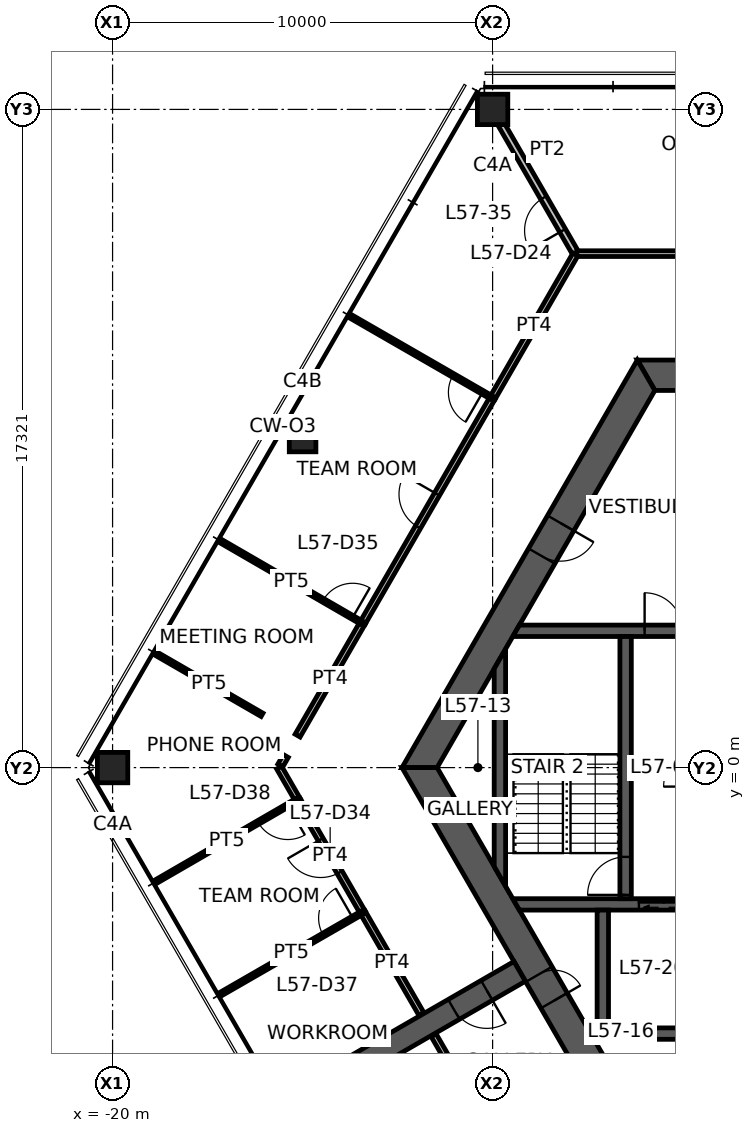
"""IFC4 building model, lengths in metres.
Left out: names, types, materials, properties, quantities, classifications, styles, units other than length and angle.
Written with IfcOpenShell. Run it as: python <this file> out.ifc"""

import sys

from ifc_helpers import new_model, si_unit, direction, frame, frame_2d, origin, origin_2d, place, context, subcontext, project, spatial, polyline, rectangle, hollow_rectangle, outline, extrude, element, fill, save


model = new_model("IFC4")
c1 = context("Model", 3, precision=1e-05, world=origin(), true_north=direction((0.0, 1.0)))
c2 = subcontext(c1, "Body", "Model", "MODEL_VIEW")
j1 = project(units=[si_unit("LENGTHUNIT", "METRE"), si_unit("PLANEANGLEUNIT", "RADIAN")], contexts=[c1])
p1 = place(None, origin())
s1 = spatial("IfcSite", under=j1, at=p1, CompositionType="ELEMENT")
p2 = place(p1, origin())
s2 = spatial("IfcBuilding", under=s1, at=p2, CompositionType="ELEMENT")
p3 = place(p2, frame((0.0, 0.0, 228.4)))
s3 = spatial("IfcBuildingStorey", under=s2, at=p3, CompositionType="ELEMENT", Elevation=228.4)
for number, where, z_axis, x_axis in (
    (1, (-10.0, 17.321, 0.0), (0.0, 0.0, 1.0), (1.0, 0.0, 0.0)),
    (2, (-20.0, 0.0, 0.0), (0.0, 0.0, 1.0), (1.0, 0.0, 0.0)),
):
    element("IfcColumn", number, at=place(p3, frame(where, z_axis=z_axis, x_axis=x_axis)), inside=s3, PredefinedType="COLUMN", context=c2, shape_type="SweptSolid", body=[
        extrude(hollow_rectangle(XDim=0.8, YDim=0.8, WallThickness=0.04, at=origin_2d()), origin(), (0.0, 0.0, 1.0), 3.9),
    ])
p4 = place(p3, frame((-15.0, 8.66, 0.0), z_axis=(0.0, 0.0, 1.0), x_axis=(1.0, 0.0, 0.0)))
e3 = element("IfcColumn", 3, at=p4, inside=s3, PredefinedType="COLUMN", context=c2, shape_type="SweptSolid", body=[
    extrude(hollow_rectangle(XDim=0.7, YDim=0.7, WallThickness=0.032, at=origin_2d()), origin(), (0.0, 0.0, 1.0), 3.9),
])
p5 = place(p3, frame((5.961, 10.325, 0.0), z_axis=(0.0, 0.0, 1.0), x_axis=(-1.0, 0.0, 0.0)))
e4 = element("IfcWall", 4, at=p5, inside=s3, PredefinedType="SHEAR", context=c2, shape_type="SweptSolid", body=[
    extrude(outline(polyline([(-0.231, -0.4), (4.636, -0.4), (5.536, -0.4), (6.386, -0.4), (7.286, -0.4), (12.153, -0.4), (11.691, 0.4), (7.286, 0.4), (6.386, 0.4), (5.536, 0.4), (4.636, 0.4), (0.231, 0.4), (-0.231, -0.4)])), origin(), (0.0, 0.0, 1.0), 3.9),
])
p6 = place(p5, frame((6.386, 0.0, 0.0)))
e5 = element("IfcOpeningElement", 5, at=p6, cuts=e4, PredefinedType="OPENING", context=c2, shape_type="SweptSolid", body=[
    extrude(rectangle(XDim=0.9, YDim=2.1, at=frame_2d((0.45, 1.05))), frame((0.0, 0.41, 0.0), z_axis=(0.0, -1.0, 0.0), x_axis=(1.0, 0.0, 0.0)), (0.0, 0.0, 1.0), 0.82),
])
p7 = place(p5, frame((4.636, 0.0, 0.0)))
e6 = element("IfcOpeningElement", 6, at=p7, cuts=e4, PredefinedType="OPENING", context=c2, shape_type="SweptSolid", body=[
    extrude(rectangle(XDim=0.9, YDim=2.1, at=frame_2d((0.45, 1.05))), frame((0.0, 0.41, 0.0), z_axis=(0.0, -1.0, 0.0), x_axis=(1.0, 0.0, 0.0)), (0.0, 0.0, 1.0), 0.82),
])
p8 = place(p3, frame((-5.961, 10.325, 0.0), z_axis=(0.0, 0.0, 1.0), x_axis=(-0.500004296715, -0.866022923061, 0.0)))
e7 = element("IfcWall", 7, at=p8, inside=s3, PredefinedType="SHEAR", context=c2, shape_type="SweptSolid", body=[
    extrude(outline(polyline([(-0.231, -0.4), (4.494, -0.4), (5.494, -0.4), (12.153, -0.4), (11.691, 0.4), (5.494, 0.4), (4.494, 0.4), (0.231, 0.4), (-0.231, -0.4)])), origin(), (0.0, 0.0, 1.0), 3.9),
])
p9 = place(p8, frame((4.494, 0.0, 0.0)))
e8 = element("IfcOpeningElement", 8, at=p9, cuts=e7, PredefinedType="OPENING", context=c2, shape_type="SweptSolid", body=[
    extrude(rectangle(XDim=1.0, YDim=2.1, at=frame_2d((0.5, 1.05))), frame((0.0, 0.41, 0.0), z_axis=(0.0, -1.0, 0.0), x_axis=(1.0, 0.0, 0.0)), (0.0, 0.0, 1.0), 0.82),
])
p10 = place(p3, frame((-11.922, 0.0, 0.0), z_axis=(0.0, 0.0, 1.0), x_axis=(0.500004296715, -0.866022923061, 0.0)))
e9 = element("IfcWall", 9, at=p10, inside=s3, PredefinedType="SHEAR", context=c2, shape_type="SweptSolid", body=[
    extrude(outline(polyline([(-0.231, -0.4), (6.281, -0.4), (7.081, -0.4), (12.153, -0.4), (11.691, 0.4), (7.081, 0.4), (6.281, 0.4), (0.231, 0.4), (-0.231, -0.4)])), origin(), (0.0, 0.0, 1.0), 3.9),
])
p11 = place(p10, frame((6.281, 0.0, 0.0)))
e10 = element("IfcOpeningElement", 10, at=p11, cuts=e9, PredefinedType="OPENING", context=c2, shape_type="SweptSolid", body=[
    extrude(rectangle(XDim=0.8, YDim=2.1, at=frame_2d((0.4, 1.05))), frame((0.0, 0.41, 0.0), z_axis=(0.0, -1.0, 0.0), x_axis=(1.0, 0.0, 0.0)), (0.0, 0.0, 1.0), 0.82),
])
p12 = place(p3, frame((-9.288, -5.363, 0.0), z_axis=(0.0, 0.0, 1.0), x_axis=(-0.866027473358, -0.499996415376, 0.0)))
e11 = element("IfcWall", 11, at=p12, inside=s3, PredefinedType="SHEAR", context=c2, shape_type="SweptSolid", body=[
    extrude(rectangle(XDim=7.045, YDim=0.6, at=frame_2d((3.523, 0.0))), origin(), (0.0, 0.0, 1.0), 3.9),
])
p13 = place(p12, frame((1.0, 0.0, 0.0)))
e12 = element("IfcOpeningElement", 12, at=p13, cuts=e11, PredefinedType="OPENING", context=c2, shape_type="SweptSolid", body=[
    extrude(rectangle(XDim=1.0, YDim=2.1, at=frame_2d((0.5, 1.05))), frame((0.0, 0.31, 0.0), z_axis=(0.0, -1.0, 0.0), x_axis=(1.0, 0.0, 0.0)), (0.0, 0.0, 1.0), 0.62),
])
p14 = place(p3, frame((-9.382, 3.6, 0.0), z_axis=(0.0, 0.0, 1.0), x_axis=(1.0, 0.0, 0.0)))
e13 = element("IfcWall", 13, at=p14, inside=s3, PredefinedType="SHEAR", context=c2, shape_type="SweptSolid", body=[
    extrude(outline(polyline([(-0.087, -0.15), (3.382, -0.15), (4.382, -0.15), (5.782, -0.15), (6.882, -0.15), (7.932, -0.15), (7.932, 0.15), (6.882, 0.15), (5.782, 0.15), (4.382, 0.15), (3.382, 0.15), (0.087, 0.15), (-0.087, -0.15)])), origin(), (0.0, 0.0, 1.0), 3.9),
])
p15 = place(p14, frame((3.382, 0.0, 0.0)))
e14 = element("IfcOpeningElement", 14, at=p15, cuts=e13, PredefinedType="OPENING", context=c2, shape_type="SweptSolid", body=[
    extrude(rectangle(XDim=1.0, YDim=2.1, at=frame_2d((0.5, 1.05))), frame((0.0, 0.16, 0.0), z_axis=(0.0, -1.0, 0.0), x_axis=(1.0, 0.0, 0.0)), (0.0, 0.0, 1.0), 0.32),
])
p16 = place(p14, frame((5.782, 0.0, 0.0)))
e15 = element("IfcOpeningElement", 15, at=p16, cuts=e13, PredefinedType="OPENING", context=c2, shape_type="SweptSolid", body=[
    extrude(rectangle(XDim=1.1, YDim=2.1, at=frame_2d((0.55, 1.05))), frame((0.0, 0.16, 0.0), z_axis=(0.0, -1.0, 0.0), x_axis=(1.0, 0.0, 0.0)), (0.0, 0.0, 1.0), 0.32),
])
p17 = place(p3, frame((-9.382, -3.6, 0.0), z_axis=(0.0, 0.0, 1.0), x_axis=(1.0, 0.0, 0.0)))
e16 = element("IfcWall", 16, at=p17, inside=s3, PredefinedType="SHEAR", context=c2, shape_type="SweptSolid", body=[
    extrude(outline(polyline([(0.087, -0.15), (3.232, -0.15), (4.532, -0.15), (5.782, -0.15), (6.882, -0.15), (7.932, -0.15), (7.932, 0.15), (6.882, 0.15), (5.782, 0.15), (4.532, 0.15), (3.232, 0.15), (-0.087, 0.15), (0.087, -0.15)])), origin(), (0.0, 0.0, 1.0), 3.9),
])
p18 = place(p17, frame((5.782, 0.0, 0.0)))
e17 = element("IfcOpeningElement", 17, at=p18, cuts=e16, PredefinedType="OPENING", context=c2, shape_type="SweptSolid", body=[
    extrude(rectangle(XDim=1.1, YDim=2.1, at=frame_2d((0.55, 1.05))), frame((0.0, 0.16, 0.0), z_axis=(0.0, -1.0, 0.0), x_axis=(1.0, 0.0, 0.0)), (0.0, 0.0, 1.0), 0.32),
])
p19 = place(p17, frame((3.232, 0.0, 0.0)))
e18 = element("IfcOpeningElement", 18, at=p19, cuts=e16, PredefinedType="OPENING", context=c2, shape_type="SweptSolid", body=[
    extrude(rectangle(XDim=1.3, YDim=2.1, at=frame_2d((0.65, 1.05))), frame((0.0, 0.16, 0.0), z_axis=(0.0, -1.0, 0.0), x_axis=(1.0, 0.0, 0.0)), (0.0, 0.0, 1.0), 0.32),
])
p20 = place(p3, frame((-6.5, -3.45, 0.0), z_axis=(0.0, 0.0, 1.0), x_axis=(0.0, 1.0, 0.0)))
e19 = element("IfcWall", 19, at=p20, inside=s3, PredefinedType="SHEAR", context=c2, shape_type="SweptSolid", body=[
    extrude(rectangle(XDim=6.9, YDim=0.3, at=frame_2d((3.45, 0.0))), origin(), (0.0, 0.0, 1.0), 3.9),
])
p21 = place(p20, frame((0.1, 0.0, 0.0)))
e20 = element("IfcOpeningElement", 20, at=p21, cuts=e19, PredefinedType="OPENING", context=c2, shape_type="SweptSolid", body=[
    extrude(rectangle(XDim=1.0, YDim=2.1, at=frame_2d((0.5, 1.05))), frame((0.0, 0.16, 0.0), z_axis=(0.0, -1.0, 0.0), x_axis=(1.0, 0.0, 0.0)), (0.0, 0.0, 1.0), 0.32),
])
p22 = place(p3, frame((-7.25, -7.0, 0.0), z_axis=(0.0, 0.0, 1.0), x_axis=(1.0, 0.0, 0.0)))
e21 = element("IfcWall", 21, at=p22, inside=s3, PredefinedType="SHEAR", context=c2, shape_type="SweptSolid", body=[
    extrude(rectangle(XDim=2.6, YDim=0.3, at=frame_2d((1.3, 0.0))), origin(), (0.0, 0.0, 1.0), 3.9),
])
p23 = place(p3, frame((-7.1, -3.75, 0.0), z_axis=(0.0, 0.0, 1.0), x_axis=(0.0, -1.0, 0.0)))
e22 = element("IfcWall", 22, at=p23, inside=s3, PredefinedType="SHEAR", context=c2, shape_type="SweptSolid", body=[
    extrude(rectangle(XDim=3.1, YDim=0.3, at=frame_2d((1.55, 0.0))), origin(), (0.0, 0.0, 1.0), 3.9),
])
p24 = place(p3, frame((-9.808, -2.862, 0.0), z_axis=(0.0, 0.0, 1.0), x_axis=(0.0, 1.0, 0.0)))
e23 = element("IfcWall", 23, at=p24, inside=s3, PredefinedType="SHEAR", context=c2, shape_type="SweptSolid", body=[
    extrude(outline(polyline([(-0.26, -0.15), (5.984, -0.15), (5.465, 0.15), (0.26, 0.15), (-0.26, -0.15)])), origin(), (0.0, 0.0, 1.0), 3.9),
])
p25 = place(p3, frame((-7.809, 13.525, 0.0), z_axis=(0.0, 0.0, 1.0), x_axis=(-0.499997299682, 0.866026962808, 0.0)))
e24 = element("IfcWall", 24, at=p25, inside=s3, PredefinedType="PARTITIONING", context=c2, shape_type="SweptSolid", body=[
    extrude(rectangle(XDim=4.383, YDim=0.175, at=frame_2d((2.191, 0.0))), origin(), (0.0, 0.0, 1.0), 3.05),
])
p26 = place(p25, frame((0.7, 0.0, 0.0)))
e25 = element("IfcOpeningElement", 25, at=p26, cuts=e24, PredefinedType="OPENING", context=c2, shape_type="SweptSolid", body=[
    extrude(rectangle(XDim=1.0, YDim=2.1, at=frame_2d((0.5, 1.05))), frame((0.0, 0.098, 0.0), z_axis=(0.0, -1.0, 0.0), x_axis=(1.0, 0.0, 0.0)), (0.0, 0.0, 1.0), 0.195),
])
p27 = place(p3, frame((-7.786, 13.525, 0.0), z_axis=(0.0, 0.0, 1.0), x_axis=(1.0, 0.0, 0.0)))
e26 = element("IfcWall", 26, at=p27, inside=s3, PredefinedType="PARTITIONING", context=c2, shape_type="SweptSolid", body=[
    extrude(rectangle(XDim=7.466, YDim=0.15, at=frame_2d((3.733, 0.0))), origin(), (0.0, 0.0, 1.0), 2.95),
])
p28 = place(p27, frame((3.233, 0.0, 0.0)))
e27 = element("IfcOpeningElement", 27, at=p28, cuts=e26, PredefinedType="OPENING", context=c2, shape_type="SweptSolid", body=[
    extrude(rectangle(XDim=1.0, YDim=2.1, at=frame_2d((0.5, 1.05))), frame((0.0, 0.085, 0.0), z_axis=(0.0, -1.0, 0.0), x_axis=(1.0, 0.0, 0.0)), (0.0, 0.0, 1.0), 0.17),
])
p29 = place(p3, frame((-15.131, 0.842, 0.0), z_axis=(0.0, 0.0, 1.0), x_axis=(0.500032973541, 0.866006365664, 0.0)))
e28 = element("IfcWall", 28, at=p29, inside=s3, PredefinedType="PARTITIONING", context=c2, shape_type="SweptSolid", body=[
    extrude(rectangle(XDim=3.426, YDim=0.15, at=frame_2d((1.713, 0.0))), origin(), (0.0, 0.0, 1.0), 2.95),
])
p30 = place(p3, frame((-10.008, 9.716, 0.0), z_axis=(0.0, 0.0, 1.0), x_axis=(0.500004234368, 0.866022959057, 0.0)))
e29 = element("IfcWall", 29, at=p30, inside=s3, PredefinedType="PARTITIONING", context=c2, shape_type="SweptSolid", body=[
    extrude(rectangle(XDim=4.375, YDim=0.15, at=frame_2d((2.188, 0.0))), origin(), (0.0, 0.0, 1.0), 2.95),
])
p31 = place(p3, frame((-11.873, -6.485, 0.0), z_axis=(0.0, 0.0, 1.0), x_axis=(-0.499958760481, 0.866049212123, 0.0)))
e30 = element("IfcWall", 30, at=p31, inside=s3, PredefinedType="PARTITIONING", context=c2, shape_type="SweptSolid", body=[
    extrude(rectangle(XDim=3.1, YDim=0.15, at=frame_2d((1.55, 0.0))), origin(), (0.0, 0.0, 1.0), 2.95),
])
p32 = place(p3, frame((-15.585, 0.056, 0.0), z_axis=(0.0, 0.0, 1.0), x_axis=(0.500164219654, 0.865930570761, 0.0)))
e31 = element("IfcWall", 31, at=p32, inside=s3, PredefinedType="PARTITIONING", context=c2, shape_type="SweptSolid", body=[
    extrude(rectangle(XDim=0.287, YDim=0.15, at=frame_2d((0.144, 0.0))), origin(), (0.0, 0.0, 1.0), 2.95),
])
p33 = place(p3, frame((-15.126, -0.851, 0.0), z_axis=(0.0, 0.0, 1.0), x_axis=(-0.499880173341, 0.866094574686, 0.0)))
e32 = element("IfcWall", 32, at=p33, inside=s3, PredefinedType="PARTITIONING", context=c2, shape_type="SweptSolid", body=[
    extrude(rectangle(XDim=0.983, YDim=0.15, at=frame_2d((0.491, 0.0))), origin(), (0.0, 0.0, 1.0), 2.95),
])
p34 = place(p3, frame((-13.423, 3.801, 0.0), z_axis=(0.0, 0.0, 1.0), x_axis=(0.500020088259, 0.866013805512, 0.0)))
e33 = element("IfcWall", 33, at=p34, inside=s3, PredefinedType="PARTITIONING", context=c2, shape_type="SweptSolid", body=[
    extrude(rectangle(XDim=6.84, YDim=0.15, at=frame_2d((3.42, 0.0))), origin(), (0.0, 0.0, 1.0), 2.95),
])
p35 = place(p34, frame((2.92, 0.0, 0.0)))
e34 = element("IfcOpeningElement", 34, at=p35, cuts=e33, PredefinedType="OPENING", context=c2, shape_type="SweptSolid", body=[
    extrude(rectangle(XDim=1.0, YDim=2.1, at=frame_2d((0.5, 1.05))), frame((0.0, 0.085, 0.0), z_axis=(0.0, -1.0, 0.0), x_axis=(1.0, 0.0, 0.0)), (0.0, 0.0, 1.0), 0.17),
])
p36 = place(p3, frame((-13.418, -3.809, 0.0), z_axis=(0.0, 0.0, 1.0), x_axis=(-0.499996058069, 0.866027679647, 0.0)))
e35 = element("IfcWall", 35, at=p36, inside=s3, PredefinedType="PARTITIONING", context=c2, shape_type="SweptSolid", body=[
    extrude(rectangle(XDim=3.424, YDim=0.15, at=frame_2d((1.712, 0.0))), origin(), (0.0, 0.0, 1.0), 2.95),
])
p37 = place(p36, frame((1.212, 0.0, 0.0)))
e36 = element("IfcOpeningElement", 36, at=p37, cuts=e35, PredefinedType="OPENING", context=c2, shape_type="SweptSolid", body=[
    extrude(rectangle(XDim=1.0, YDim=2.1, at=frame_2d((0.5, 1.05))), frame((0.0, 0.085, 0.0), z_axis=(0.0, -1.0, 0.0), x_axis=(1.0, 0.0, 0.0)), (0.0, 0.0, 1.0), 0.17),
])
p38 = place(p3, frame((-16.067, 1.388, 0.0), z_axis=(0.0, 0.0, 1.0), x_axis=(-0.866010186656, 0.500026355914, 0.0)))
e37 = element("IfcWall", 37, at=p38, inside=s3, PredefinedType="PARTITIONING", context=c2, shape_type="SweptSolid", body=[
    extrude(rectangle(XDim=3.222, YDim=0.1, at=frame_2d((1.611, 0.0))), origin(), (0.0, 0.0, 1.0), 2.95),
])
p39 = place(p3, frame((-17.171, 5.97, 0.0), z_axis=(0.0, 0.0, 1.0), x_axis=(0.865485466478, -0.500934034894, 0.0)))
e38 = element("IfcWall", 38, at=p39, inside=s3, PredefinedType="PARTITIONING", context=c2, shape_type="SweptSolid", body=[
    extrude(rectangle(XDim=4.33, YDim=0.1, at=frame_2d((2.165, 0.0))), origin(), (0.0, 0.0, 1.0), 2.95),
])
p40 = place(p39, frame((3.131, 0.0, 0.0)))
e39 = element("IfcOpeningElement", 39, at=p40, cuts=e38, PredefinedType="OPENING", context=c2, shape_type="SweptSolid", body=[
    extrude(rectangle(XDim=0.9, YDim=2.1, at=frame_2d((0.45, 1.05))), frame((0.0, 0.06, 0.0), z_axis=(0.0, -1.0, 0.0), x_axis=(1.0, 0.0, 0.0)), (0.0, 0.0, 1.0), 0.12),
])
p41 = place(p3, frame((-10.003, 9.724, 0.0), z_axis=(0.0, 0.0, 1.0), x_axis=(-0.866566724083, 0.499061231426, 0.0)))
e40 = element("IfcWall", 40, at=p41, inside=s3, PredefinedType="PARTITIONING", context=c2, shape_type="SweptSolid", body=[
    extrude(rectangle(XDim=4.305, YDim=0.1, at=frame_2d((2.153, 0.0))), origin(), (0.0, 0.0, 1.0), 2.95),
])
p42 = place(p41, frame((0.3, 0.0, 0.0)))
e41 = element("IfcOpeningElement", 41, at=p42, cuts=e40, PredefinedType="OPENING", context=c2, shape_type="SweptSolid", body=[
    extrude(rectangle(XDim=0.9, YDim=2.1, at=frame_2d((0.45, 1.05))), frame((0.0, 0.06, 0.0), z_axis=(0.0, -1.0, 0.0), x_axis=(1.0, 0.0, 0.0)), (0.0, 0.0, 1.0), 0.12),
])
p43 = place(p3, frame((-17.171, -5.97, 0.0), z_axis=(0.0, 0.0, 1.0), x_axis=(0.866548575966, 0.499092742374, 0.0)))
e42 = element("IfcWall", 42, at=p43, inside=s3, PredefinedType="PARTITIONING", context=c2, shape_type="SweptSolid", body=[
    extrude(rectangle(XDim=4.331, YDim=0.1, at=frame_2d((2.165, 0.0))), origin(), (0.0, 0.0, 1.0), 2.95),
])
p44 = place(p43, frame((3.131, 0.0, 0.0)))
e43 = element("IfcOpeningElement", 43, at=p44, cuts=e42, PredefinedType="OPENING", context=c2, shape_type="SweptSolid", body=[
    extrude(rectangle(XDim=0.9, YDim=2.1, at=frame_2d((0.45, 1.05))), frame((0.0, 0.06, 0.0), z_axis=(0.0, -1.0, 0.0), x_axis=(1.0, 0.0, 0.0)), (0.0, 0.0, 1.0), 0.12),
])
p45 = place(p3, frame((-15.131, -0.843, 0.0), z_axis=(0.0, 0.0, 1.0), x_axis=(-0.865525911664, -0.500864149484, 0.0)))
e44 = element("IfcWall", 44, at=p45, inside=s3, PredefinedType="PARTITIONING", context=c2, shape_type="SweptSolid", body=[
    extrude(rectangle(XDim=4.306, YDim=0.1, at=frame_2d((2.153, 0.0))), origin(), (0.0, 0.0, 1.0), 2.95),
])
p46 = place(p45, frame((0.3, 0.0, 0.0)))
e45 = element("IfcOpeningElement", 45, at=p46, cuts=e44, PredefinedType="OPENING", context=c2, shape_type="SweptSolid", body=[
    extrude(rectangle(XDim=0.9, YDim=2.1, at=frame_2d((0.45, 1.05))), frame((0.0, 0.06, 0.0), z_axis=(0.0, -1.0, 0.0), x_axis=(1.0, 0.0, 0.0)), (0.0, 0.0, 1.0), 0.12),
])
p47 = place(p3, frame((-10.911, -8.152, 0.0), z_axis=(0.0, 0.0, 1.0), x_axis=(-0.499859560919, 0.866106471144, 0.0)))
e46 = element("IfcWall", 46, at=p47, inside=s3, PredefinedType="PARTITIONING", context=c2, shape_type="SweptSolid", body=[
    extrude(rectangle(XDim=1.284, YDim=0.15, at=frame_2d((0.642, 0.0))), origin(), (0.0, 0.0, 1.0), 2.95),
])
p48 = place(p11, origin())
e47 = element("IfcDoor", 47, at=p48, inside=s3, OperationType="SINGLE_SWING_RIGHT", PredefinedType="DOOR", context=c2, shape_type="SweptSolid", body=[
    extrude(rectangle(XDim=0.8, YDim=2.1, at=frame_2d((0.4, 1.05))), frame((0.0, 0.025, 0.0), z_axis=(0.0, -1.0, 0.0), x_axis=(1.0, 0.0, 0.0)), (0.0, 0.0, 1.0), 0.05),
])
fill(e10, e47)
p49 = place(p9, origin())
e48 = element("IfcDoor", 48, at=p49, inside=s3, OperationType="SINGLE_SWING_LEFT", PredefinedType="DOOR", context=c2, shape_type="SweptSolid", body=[
    extrude(rectangle(XDim=1.0, YDim=2.1, at=frame_2d((0.5, 1.05))), frame((0.0, 0.025, 0.0), z_axis=(0.0, -1.0, 0.0), x_axis=(1.0, 0.0, 0.0)), (0.0, 0.0, 1.0), 0.05),
])
fill(e8, e48)
p50 = place(p21, origin())
e49 = element("IfcDoor", 49, at=p50, inside=s3, OperationType="SINGLE_SWING_LEFT", PredefinedType="DOOR", context=c2, shape_type="SweptSolid", body=[
    extrude(rectangle(XDim=1.0, YDim=2.1, at=frame_2d((0.5, 1.05))), frame((0.0, 0.025, 0.0), z_axis=(0.0, -1.0, 0.0), x_axis=(1.0, 0.0, 0.0)), (0.0, 0.0, 1.0), 0.05),
])
fill(e20, e49)
p51 = place(p15, origin())
e50 = element("IfcDoor", 50, at=p51, inside=s3, OperationType="SINGLE_SWING_LEFT", PredefinedType="DOOR", context=c2, shape_type="SweptSolid", body=[
    extrude(rectangle(XDim=1.0, YDim=2.1, at=frame_2d((0.5, 1.05))), frame((0.0, 0.025, 0.0), z_axis=(0.0, -1.0, 0.0), x_axis=(1.0, 0.0, 0.0)), (0.0, 0.0, 1.0), 0.05),
])
fill(e14, e50)
p52 = place(p13, origin())
e51 = element("IfcDoor", 51, at=p52, inside=s3, OperationType="SINGLE_SWING_LEFT", PredefinedType="DOOR", context=c2, shape_type="SweptSolid", body=[
    extrude(rectangle(XDim=1.0, YDim=2.1, at=frame_2d((0.5, 1.05))), frame((0.0, 0.025, 0.0), z_axis=(0.0, -1.0, 0.0), x_axis=(1.0, 0.0, 0.0)), (0.0, 0.0, 1.0), 0.05),
])
fill(e12, e51)
p53 = place(p26, origin())
e52 = element("IfcDoor", 52, at=p53, inside=s3, OperationType="SINGLE_SWING_LEFT", PredefinedType="DOOR", context=c2, shape_type="SweptSolid", body=[
    extrude(rectangle(XDim=1.0, YDim=2.1, at=frame_2d((0.5, 1.05))), frame((0.0, 0.025, 0.0), z_axis=(0.0, -1.0, 0.0), x_axis=(1.0, 0.0, 0.0)), (0.0, 0.0, 1.0), 0.05),
])
fill(e25, e52)
p54 = place(p35, origin())
e53 = element("IfcDoor", 53, at=p54, inside=s3, OperationType="SINGLE_SWING_RIGHT", PredefinedType="DOOR", context=c2, shape_type="SweptSolid", body=[
    extrude(rectangle(XDim=1.0, YDim=2.1, at=frame_2d((0.5, 1.05))), frame((0.0, 0.025, 0.0), z_axis=(0.0, -1.0, 0.0), x_axis=(1.0, 0.0, 0.0)), (0.0, 0.0, 1.0), 0.05),
])
fill(e34, e53)
p55 = place(p37, origin())
e54 = element("IfcDoor", 54, at=p55, inside=s3, OperationType="SINGLE_SWING_RIGHT", PredefinedType="DOOR", context=c2, shape_type="SweptSolid", body=[
    extrude(rectangle(XDim=1.0, YDim=2.1, at=frame_2d((0.5, 1.05))), frame((0.0, 0.025, 0.0), z_axis=(0.0, -1.0, 0.0), x_axis=(1.0, 0.0, 0.0)), (0.0, 0.0, 1.0), 0.05),
])
fill(e36, e54)
p56 = place(p40, origin())
e55 = element("IfcDoor", 55, at=p56, inside=s3, OperationType="SINGLE_SWING_RIGHT", PredefinedType="DOOR", context=c2, shape_type="SweptSolid", body=[
    extrude(rectangle(XDim=0.9, YDim=2.1, at=frame_2d((0.45, 1.05))), frame((0.0, 0.025, 0.0), z_axis=(0.0, -1.0, 0.0), x_axis=(1.0, 0.0, 0.0)), (0.0, 0.0, 1.0), 0.05),
])
fill(e39, e55)
p57 = place(p42, origin())
e56 = element("IfcDoor", 56, at=p57, inside=s3, OperationType="SINGLE_SWING_LEFT", PredefinedType="DOOR", context=c2, shape_type="SweptSolid", body=[
    extrude(rectangle(XDim=0.9, YDim=2.1, at=frame_2d((0.45, 1.05))), frame((0.0, 0.025, 0.0), z_axis=(0.0, -1.0, 0.0), x_axis=(1.0, 0.0, 0.0)), (0.0, 0.0, 1.0), 0.05),
])
fill(e41, e56)
p58 = place(p44, origin())
e57 = element("IfcDoor", 57, at=p58, inside=s3, OperationType="SINGLE_SWING_RIGHT", PredefinedType="DOOR", context=c2, shape_type="SweptSolid", body=[
    extrude(rectangle(XDim=0.9, YDim=2.1, at=frame_2d((0.45, 1.05))), frame((0.0, 0.025, 0.0), z_axis=(0.0, -1.0, 0.0), x_axis=(1.0, 0.0, 0.0)), (0.0, 0.0, 1.0), 0.05),
])
fill(e43, e57)
p59 = place(p46, origin())
e58 = element("IfcDoor", 58, at=p59, inside=s3, OperationType="SINGLE_SWING_LEFT", PredefinedType="DOOR", context=c2, shape_type="SweptSolid", body=[
    extrude(rectangle(XDim=0.9, YDim=2.1, at=frame_2d((0.45, 1.05))), frame((0.0, 0.025, 0.0), z_axis=(0.0, -1.0, 0.0), x_axis=(1.0, 0.0, 0.0)), (0.0, 0.0, 1.0), 0.05),
])
fill(e45, e58)
p60 = place(p19, origin())
e59 = element("IfcDoor", 59, at=p60, inside=s3, OperationType="DOUBLE_DOOR_SLIDING", PredefinedType="DOOR", context=c2, shape_type="SweptSolid", body=[
    extrude(rectangle(XDim=1.3, YDim=2.1, at=frame_2d((0.65, 1.05))), frame((0.0, 0.025, 0.0), z_axis=(0.0, -1.0, 0.0), x_axis=(1.0, 0.0, 0.0)), (0.0, 0.0, 1.0), 0.05),
])
fill(e18, e59)
save(model, sys.argv[1])
